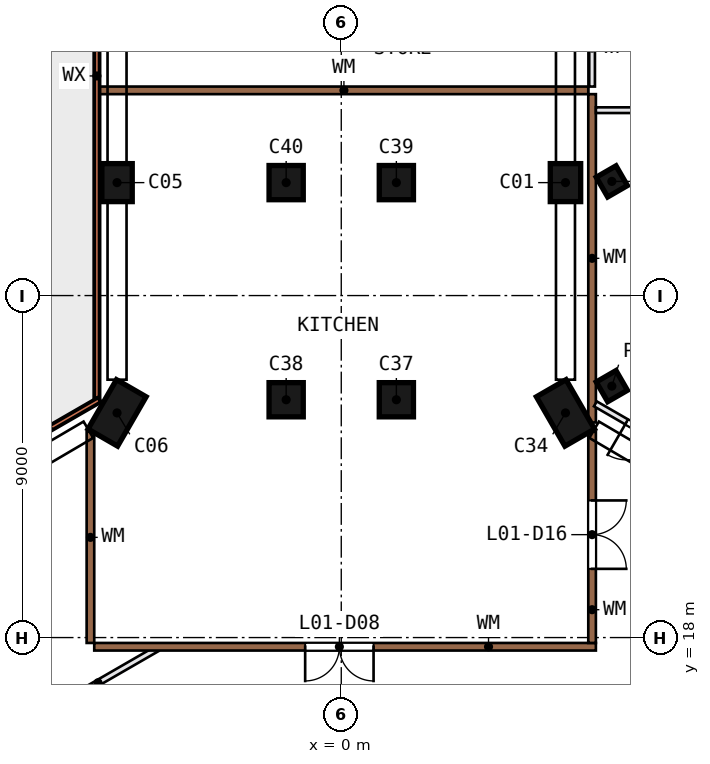
"""IFC4 building model, lengths in metres.
Left out: names, types, materials, properties, quantities, classifications, styles, units other than length and angle.
Written with IfcOpenShell. Run it as: python <this file> out.ifc"""

import sys

from ifc_helpers import new_model, si_unit, direction, frame, frame_2d, origin, origin_2d, place, context, subcontext, project, spatial, rectangle, extrude, element, fill, save


model = new_model("IFC4")
c1 = context("Model", 3, precision=1e-05, world=origin(), true_north=direction((0.0, 1.0)))
c2 = subcontext(c1, "Body", "Model", "MODEL_VIEW")
j1 = project(units=[si_unit("LENGTHUNIT", "METRE"), si_unit("PLANEANGLEUNIT", "RADIAN")], contexts=[c1])
p1 = place(None, origin())
s1 = spatial("IfcSite", under=j1, at=p1, CompositionType="ELEMENT")
p2 = place(p1, origin())
s2 = spatial("IfcBuilding", under=s1, at=p2, CompositionType="ELEMENT")
p3 = place(p2, frame((0.0, 0.0, 8.0)))
s3 = spatial("IfcBuildingStorey", under=s2, at=p3, CompositionType="ELEMENT", Elevation=8.0)
for number, where, z_axis, x_axis in (
    (1, (5.9, 29.972, 0.0), (0.0, 0.0, 1.0), (0.0, 1.0, 0.0)),
    (2, (-5.9, 29.972, 0.0), (0.0, 0.0, 1.0), (0.0, -1.0, 0.0)),
):
    element("IfcColumn", number, at=place(p3, frame(where, z_axis=z_axis, x_axis=x_axis)), inside=s3, PredefinedType="COLUMN", context=c2, shape_type="SweptSolid", body=[
        extrude(rectangle(XDim=1.0, YDim=0.8, at=origin_2d()), origin(), (0.0, 0.0, 1.0), 5.55),
    ])
for number, where, z_axis, x_axis in (
    (3, (-5.9, 23.912, 0.0), (0.0, 0.0, 1.0), (0.5, 0.866, 0.0)),
    (4, (5.9, 23.912, 0.0), (0.0, 0.0, 1.0), (0.5, -0.866, 0.0)),
):
    element("IfcColumn", number, at=place(p3, frame(where, z_axis=z_axis, x_axis=x_axis)), inside=s3, PredefinedType="COLUMN", context=c2, shape_type="SweptSolid", body=[
        extrude(rectangle(XDim=1.5, YDim=0.9, at=origin_2d()), origin(), (0.0, 0.0, 1.0), 5.55),
    ])
for number, where, z_axis, x_axis in (
    (5, (1.45, 24.258, 0.0), (0.0, 0.0, 1.0), (0.0, 1.0, 0.0)),
    (6, (-1.45, 24.258, 0.0), (0.0, 0.0, 1.0), (0.0, 1.0, 0.0)),
    (7, (1.45, 29.972, 0.0), (0.0, 0.0, 1.0), (0.0, 1.0, 0.0)),
    (8, (-1.45, 29.972, 0.0), (0.0, 0.0, 1.0), (0.0, 1.0, 0.0)),
):
    element("IfcColumn", number, at=place(p3, frame(where, z_axis=z_axis, x_axis=x_axis)), inside=s3, PredefinedType="COLUMN", context=c2, shape_type="SweptSolid", body=[
        extrude(rectangle(XDim=0.9, YDim=0.9, at=origin_2d()), origin(), (0.0, 0.0, 1.0), 5.55),
    ])
for number, where, z_axis, x_axis in (
    (9, (7.12, 24.616, 0.0), (0.0, 0.0, 1.0), (0.866, 0.5, 0.0)),
    (10, (7.12, 30.004, 0.0), (0.0, 0.0, 1.0), (0.866, 0.5, 0.0)),
):
    element("IfcColumn", number, at=place(p3, frame(where, z_axis=z_axis, x_axis=x_axis)), inside=s3, PredefinedType="COLUMN", context=c2, shape_type="SweptSolid", body=[
        extrude(rectangle(XDim=0.6, YDim=0.6, at=origin_2d()), origin(), (0.0, 0.0, 1.0), 6.0),
    ])
p4 = place(p3, frame((-6.43, 41.26, 0.0), z_axis=(0.0, 0.0, 1.0), x_axis=(0.0, -1.0, 0.0)))
e11 = element("IfcWall", 11, at=p4, inside=s3, PredefinedType="SOLIDWALL", context=c2, shape_type="SweptSolid", body=[
    extrude(rectangle(XDim=16.961, YDim=0.14, at=frame_2d((8.481, 0.0))), origin(), (0.0, 0.0, 1.0), 5.55),
])
p5 = place(p3, frame((-6.36, 24.258, 0.0), z_axis=(0.0, 0.0, 1.0), x_axis=(-0.866029009, -0.499993756, 0.0)))
e12 = element("IfcWall", 12, at=p5, inside=s3, PredefinedType="SOLIDWALL", context=c2, shape_type="SweptSolid", body=[
    extrude(rectangle(XDim=13.242, YDim=0.14, at=frame_2d((6.621, 0.0))), origin(), (0.0, 0.0, 1.0), 5.55),
])
p6 = place(p5, frame((1.46, 0.0, 0.9)))
e13 = element("IfcOpeningElement", 13, at=p6, cuts=e12, PredefinedType="OPENING", context=c2, shape_type="SweptSolid", body=[
    extrude(rectangle(XDim=3.6, YDim=3.6, at=frame_2d((1.8, 1.8))), frame((0.0, 0.08, 0.0), z_axis=(0.0, -1.0, 0.0), x_axis=(1.0, 0.0, 0.0)), (0.0, 0.0, 1.0), 0.16),
])
p7 = place(p5, frame((8.215, 0.0, 0.9)))
e14 = element("IfcOpeningElement", 14, at=p7, cuts=e12, PredefinedType="OPENING", context=c2, shape_type="SweptSolid", body=[
    extrude(rectangle(XDim=3.0, YDim=3.6, at=frame_2d((1.5, 1.8))), frame((0.0, 0.08, 0.0), z_axis=(0.0, -1.0, 0.0), x_axis=(1.0, 0.0, 0.0)), (0.0, 0.0, 1.0), 0.16),
])
p8 = place(p3, frame((-4.845, 17.708, 0.0), z_axis=(0.0, 0.0, 1.0), x_axis=(-0.866032826, -0.499987144, 0.0)))
e15 = element("IfcWall", 15, at=p8, inside=s3, PredefinedType="PARTITIONING", context=c2, shape_type="SweptSolid", body=[
    extrude(rectangle(XDim=9.342, YDim=0.15, at=frame_2d((4.671, 0.0))), origin(), (0.0, 0.0, 1.0), 5.55),
])
p9 = place(p8, frame((3.792, 0.0, 0.0)))
e16 = element("IfcOpeningElement", 16, at=p9, cuts=e15, PredefinedType="OPENING", context=c2, shape_type="SweptSolid", body=[
    extrude(rectangle(XDim=1.8, YDim=2.1, at=frame_2d((0.9, 1.05))), frame((0.0, 0.085, 0.0), z_axis=(0.0, -1.0, 0.0), x_axis=(1.0, 0.0, 0.0)), (0.0, 0.0, 1.0), 0.17),
])
p10 = place(p3, frame((6.7, 17.758, 0.0), z_axis=(0.0, 0.0, 1.0), x_axis=(-1.0, 0.0, 0.0)))
e17 = element("IfcWall", 17, at=p10, inside=s3, PredefinedType="SOLIDWALL", context=c2, shape_type="SweptSolid", body=[
    extrude(rectangle(XDim=13.2, YDim=0.2, at=frame_2d((6.6, 0.0))), origin(), (0.0, 0.0, 1.0), 5.55),
])
p11 = place(p10, frame((5.85, 0.0, 0.0)))
e18 = element("IfcOpeningElement", 18, at=p11, cuts=e17, PredefinedType="OPENING", context=c2, shape_type="SweptSolid", body=[
    extrude(rectangle(XDim=1.8, YDim=2.1, at=frame_2d((0.9, 1.05))), frame((0.0, 0.11, 0.0), z_axis=(0.0, -1.0, 0.0), x_axis=(1.0, 0.0, 0.0)), (0.0, 0.0, 1.0), 0.22),
])
p12 = place(p3, frame((-6.6, 23.415, 0.0), z_axis=(0.0, 0.0, 1.0), x_axis=(0.0, -1.0, 0.0)))
e19 = element("IfcWall", 19, at=p12, inside=s3, PredefinedType="SOLIDWALL", context=c2, shape_type="SweptSolid", body=[
    extrude(rectangle(XDim=5.557, YDim=0.2, at=frame_2d((2.778, 0.0))), origin(), (0.0, 0.0, 1.0), 5.55),
])
p13 = place(p3, frame((6.6, 23.415, 0.0), z_axis=(0.0, 0.0, 1.0), x_axis=(0.0, -1.0, 0.0)))
e20 = element("IfcWall", 20, at=p13, inside=s3, PredefinedType="SOLIDWALL", context=c2, shape_type="SweptSolid", body=[
    extrude(rectangle(XDim=5.557, YDim=0.2, at=frame_2d((2.778, 0.0))), origin(), (0.0, 0.0, 1.0), 5.55),
])
p14 = place(p13, frame((1.807, 0.0, 0.0)))
e21 = element("IfcOpeningElement", 21, at=p14, cuts=e20, PredefinedType="OPENING", context=c2, shape_type="SweptSolid", body=[
    extrude(rectangle(XDim=1.8, YDim=2.1, at=frame_2d((0.9, 1.05))), frame((0.0, 0.11, 0.0), z_axis=(0.0, -1.0, 0.0), x_axis=(1.0, 0.0, 0.0)), (0.0, 0.0, 1.0), 0.22),
])
p15 = place(p3, frame((6.6, 23.659, 0.0), z_axis=(0.0, 0.0, 1.0), x_axis=(0.0, 1.0, 0.0)))
e22 = element("IfcWall", 22, at=p15, inside=s3, PredefinedType="SOLIDWALL", context=c2, shape_type="SweptSolid", body=[
    extrude(rectangle(XDim=8.641, YDim=0.2, at=frame_2d((4.32, 0.0))), origin(), (0.0, 0.0, 1.0), 5.55),
])
p16 = place(p3, frame((13.598, 20.16, 0.0), z_axis=(0.0, 0.0, 1.0), x_axis=(-0.866016972, 0.500014603, 0.0)))
e23 = element("IfcWall", 23, at=p16, inside=s3, PredefinedType="PARTITIONING", context=c2, shape_type="SweptSolid", body=[
    extrude(rectangle(XDim=7.981, YDim=0.15, at=frame_2d((3.991, 0.0))), origin(), (0.0, 0.0, 1.0), 5.55),
])
p17 = place(p16, frame((6.031, 0.0, 0.0)))
e24 = element("IfcOpeningElement", 24, at=p17, cuts=e23, PredefinedType="OPENING", context=c2, shape_type="SweptSolid", body=[
    extrude(rectangle(XDim=1.0, YDim=2.1, at=frame_2d((0.5, 1.05))), frame((0.0, 0.085, 0.0), z_axis=(0.0, -1.0, 0.0), x_axis=(1.0, 0.0, 0.0)), (0.0, 0.0, 1.0), 0.17),
])
p18 = place(p16, frame((3.231, 0.0, 0.0)))
e25 = element("IfcOpeningElement", 25, at=p18, cuts=e23, PredefinedType="OPENING", context=c2, shape_type="SweptSolid", body=[
    extrude(rectangle(XDim=1.8, YDim=2.1, at=frame_2d((0.9, 1.05))), frame((0.0, 0.085, 0.0), z_axis=(0.0, -1.0, 0.0), x_axis=(1.0, 0.0, 0.0)), (0.0, 0.0, 1.0), 0.17),
])
p19 = place(p3, frame((6.5, 32.4, 0.0), z_axis=(0.0, 0.0, 1.0), x_axis=(-1.0, 0.0, 0.0)))
e26 = element("IfcWall", 26, at=p19, inside=s3, PredefinedType="SOLIDWALL", context=c2, shape_type="SweptSolid", body=[
    extrude(rectangle(XDim=12.86, YDim=0.2, at=frame_2d((6.43, 0.0))), origin(), (0.0, 0.0, 1.0), 5.55),
])
p20 = place(p3, frame((6.6, 32.5, 0.0), z_axis=(0.0, 0.0, 1.0), x_axis=(0.0, 1.0, 0.0)))
e27 = element("IfcWall", 27, at=p20, inside=s3, PredefinedType="PARTITIONING", context=c2, shape_type="SweptSolid", body=[
    extrude(rectangle(XDim=2.025, YDim=0.15, at=frame_2d((1.013, 0.0))), origin(), (0.0, 0.0, 1.0), 5.55),
])
p21 = place(p3, frame((6.7, 31.878, 0.0), z_axis=(0.0, 0.0, 1.0), x_axis=(1.0, 0.0, 0.0)))
e28 = element("IfcWall", 28, at=p21, inside=s3, PredefinedType="PARTITIONING", context=c2, shape_type="SweptSolid", body=[
    extrude(rectangle(XDim=19.317, YDim=0.15, at=frame_2d((9.659, 0.0))), origin(), (0.0, 0.0, 1.0), 5.55),
])
p22 = place(p21, frame((9.167, 0.0, 0.0)))
e29 = element("IfcOpeningElement", 29, at=p22, cuts=e28, PredefinedType="OPENING", context=c2, shape_type="SweptSolid", body=[
    extrude(rectangle(XDim=1.0, YDim=2.1, at=frame_2d((0.5, 1.05))), frame((0.0, 0.085, 0.0), z_axis=(0.0, -1.0, 0.0), x_axis=(1.0, 0.0, 0.0)), (0.0, 0.0, 1.0), 0.17),
])
p23 = place(p11, origin())
e30 = element("IfcDoor", 30, at=p23, inside=s3, OperationType="DOUBLE_DOOR_SINGLE_SWING", PredefinedType="DOOR", context=c2, shape_type="SweptSolid", body=[
    extrude(rectangle(XDim=1.8, YDim=2.1, at=frame_2d((0.9, 1.05))), frame((0.0, 0.025, 0.0), z_axis=(0.0, -1.0, 0.0), x_axis=(1.0, 0.0, 0.0)), (0.0, 0.0, 1.0), 0.05),
])
fill(e18, e30)
p24 = place(p14, origin())
e31 = element("IfcDoor", 31, at=p24, inside=s3, OperationType="DOUBLE_DOOR_SINGLE_SWING", PredefinedType="DOOR", context=c2, shape_type="SweptSolid", body=[
    extrude(rectangle(XDim=1.8, YDim=2.1, at=frame_2d((0.9, 1.05))), frame((0.0, 0.025, 0.0), z_axis=(0.0, -1.0, 0.0), x_axis=(1.0, 0.0, 0.0)), (0.0, 0.0, 1.0), 0.05),
])
fill(e21, e31)
p25 = place(p17, origin())
e32 = element("IfcDoor", 32, at=p25, inside=s3, OperationType="SINGLE_SWING_RIGHT", PredefinedType="DOOR", context=c2, shape_type="SweptSolid", body=[
    extrude(rectangle(XDim=1.0, YDim=2.1, at=frame_2d((0.5, 1.05))), frame((0.0, 0.025, 0.0), z_axis=(0.0, -1.0, 0.0), x_axis=(1.0, 0.0, 0.0)), (0.0, 0.0, 1.0), 0.05),
])
fill(e24, e32)
save(model, sys.argv[1])
